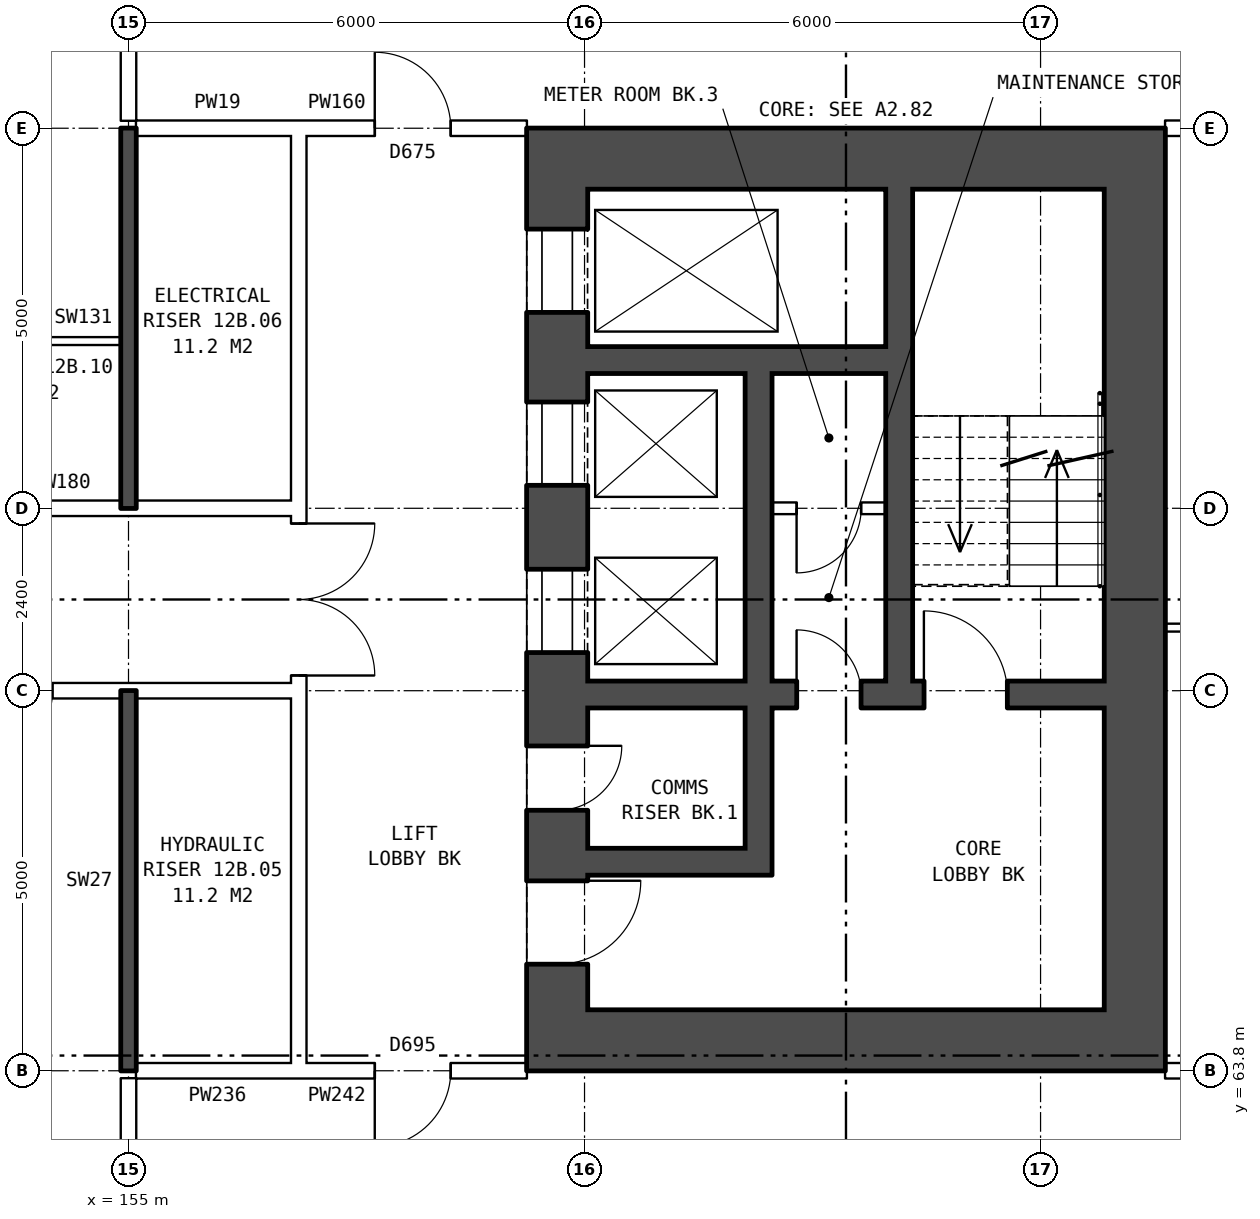
"""IFC4 building model, lengths in metres.
Left out: names, types, materials, properties, quantities, classifications, styles, units other than length and angle.
Written with IfcOpenShell. Run it as: python <this file> out.ifc"""

import sys

from ifc_helpers import new_model, si_unit, direction, frame, frame_2d, origin, place, context, subcontext, project, spatial, rectangle, extrude, element, fill, save


model = new_model("IFC4")
c1 = context("Model", 3, precision=1e-05, world=origin(), true_north=direction((0.0, 1.0)))
c2 = subcontext(c1, "Body", "Model", "MODEL_VIEW")
j1 = project(units=[si_unit("LENGTHUNIT", "METRE"), si_unit("PLANEANGLEUNIT", "RADIAN")], contexts=[c1])
p1 = place(None, origin())
s1 = spatial("IfcSite", under=j1, at=p1, CompositionType="ELEMENT")
p2 = place(p1, origin())
s2 = spatial("IfcBuilding", under=s1, at=p2, CompositionType="ELEMENT")
p3 = place(p2, frame((0.0, 0.0, 47.4)))
s3 = spatial("IfcBuildingStorey", under=s2, at=p3, CompositionType="ELEMENT", Elevation=47.4)
p4 = place(p3, frame((160.64, 75.4, 0.0), z_axis=(0.0, 0.0, 1.0), x_axis=(0.0, -1.0, 0.0)))
e1 = element("IfcWall", 1, at=p4, inside=s3, PredefinedType="SHEAR", context=c2, shape_type="SweptSolid", body=[
    extrude(rectangle(XDim=10.8, YDim=0.8, at=frame_2d((5.4, 0.0))), origin(), (0.0, 0.0, 1.0), 2.85),
])
p5 = place(p4, frame((0.525, 0.0, 0.0)))
e2 = element("IfcOpeningElement", 2, at=p5, cuts=e1, PredefinedType="OPENING", context=c2, shape_type="SweptSolid", body=[
    extrude(rectangle(XDim=1.1, YDim=2.1, at=frame_2d((0.55, 1.05))), frame((0.0, 0.41, 0.0), z_axis=(0.0, -1.0, 0.0), x_axis=(1.0, 0.0, 0.0)), (0.0, 0.0, 1.0), 0.82),
])
p6 = place(p4, frame((2.8, 0.0, 0.0)))
e3 = element("IfcOpeningElement", 3, at=p6, cuts=e1, PredefinedType="OPENING", context=c2, shape_type="SweptSolid", body=[
    extrude(rectangle(XDim=1.1, YDim=2.1, at=frame_2d((0.55, 1.05))), frame((0.0, 0.41, 0.0), z_axis=(0.0, -1.0, 0.0), x_axis=(1.0, 0.0, 0.0)), (0.0, 0.0, 1.0), 0.82),
])
p7 = place(p4, frame((5.0, 0.0, 0.0)))
e4 = element("IfcOpeningElement", 4, at=p7, cuts=e1, PredefinedType="OPENING", context=c2, shape_type="SweptSolid", body=[
    extrude(rectangle(XDim=1.1, YDim=2.1, at=frame_2d((0.55, 1.05))), frame((0.0, 0.41, 0.0), z_axis=(0.0, -1.0, 0.0), x_axis=(1.0, 0.0, 0.0)), (0.0, 0.0, 1.0), 0.82),
])
p8 = place(p4, frame((9.1, 0.0, 0.0)))
e5 = element("IfcOpeningElement", 5, at=p8, cuts=e1, PredefinedType="OPENING", context=c2, shape_type="SweptSolid", body=[
    extrude(rectangle(XDim=1.1, YDim=2.1, at=frame_2d((0.55, 1.05))), frame((0.0, 0.41, 0.0), z_axis=(0.0, -1.0, 0.0), x_axis=(1.0, 0.0, 0.0)), (0.0, 0.0, 1.0), 0.82),
])
p9 = place(p4, frame((7.325, 0.0, 0.0)))
e6 = element("IfcOpeningElement", 6, at=p9, cuts=e1, PredefinedType="OPENING", context=c2, shape_type="SweptSolid", body=[
    extrude(rectangle(XDim=0.85, YDim=2.1, at=frame_2d((0.425, 1.05))), frame((0.0, 0.41, 0.0), z_axis=(0.0, -1.0, 0.0), x_axis=(1.0, 0.0, 0.0)), (0.0, 0.0, 1.0), 0.82),
])
p10 = place(p3, frame((168.24, 75.4, 0.0), z_axis=(0.0, 0.0, 1.0), x_axis=(0.0, -1.0, 0.0)))
e7 = element("IfcWall", 7, at=p10, inside=s3, PredefinedType="SHEAR", context=c2, shape_type="SweptSolid", body=[
    extrude(rectangle(XDim=10.8, YDim=0.8, at=frame_2d((5.4, 0.0))), origin(), (0.0, 0.0, 1.0), 2.85),
])
for number, where, z_axis, x_axis in (
    (8, (160.24, 75.8, 0.0), (0.0, 0.0, 1.0), (1.0, 0.0, 0.0)),
    (9, (160.24, 64.2, 0.0), (0.0, 0.0, 1.0), (1.0, 0.0, 0.0)),
):
    element("IfcWall", number, at=place(p3, frame(where, z_axis=z_axis, x_axis=x_axis)), inside=s3, PredefinedType="SHEAR", context=c2, shape_type="SweptSolid", body=[
        extrude(rectangle(XDim=8.4, YDim=0.8, at=frame_2d((4.2, 0.0))), origin(), (0.0, 0.0, 1.0), 2.85),
    ])
p11 = place(p3, frame((161.04, 73.15, 0.0), z_axis=(0.0, 0.0, 1.0), x_axis=(1.0, 0.0, 0.0)))
e10 = element("IfcWall", 10, at=p11, inside=s3, PredefinedType="SHEAR", context=c2, shape_type="SweptSolid", body=[
    extrude(rectangle(XDim=3.925, YDim=0.35, at=frame_2d((1.962, 0.0))), origin(), (0.0, 0.0, 1.0), 2.85),
])
p12 = place(p3, frame((163.465, 71.2, 0.0), z_axis=(0.0, 0.0, 1.0), x_axis=(1.0, 0.0, 0.0)))
e11 = element("IfcWall", 11, at=p12, inside=s3, PredefinedType="PARTITIONING", context=c2, shape_type="SweptSolid", body=[
    extrude(rectangle(XDim=1.5, YDim=0.15, at=frame_2d((0.75, 0.0))), origin(), (0.0, 0.0, 1.0), 2.85),
])
p13 = place(p12, frame((0.325, 0.0, 0.0)))
e12 = element("IfcOpeningElement", 12, at=p13, cuts=e11, PredefinedType="OPENING", context=c2, shape_type="SweptSolid", body=[
    extrude(rectangle(XDim=0.85, YDim=2.1, at=frame_2d((0.425, 1.05))), frame((0.0, 0.085, 0.0), z_axis=(0.0, -1.0, 0.0), x_axis=(1.0, 0.0, 0.0)), (0.0, 0.0, 1.0), 0.17),
])
p14 = place(p3, frame((161.04, 68.75, 0.0), z_axis=(0.0, 0.0, 1.0), x_axis=(1.0, 0.0, 0.0)))
e13 = element("IfcWall", 13, at=p14, inside=s3, PredefinedType="SHEAR", context=c2, shape_type="SweptSolid", body=[
    extrude(rectangle(XDim=6.8, YDim=0.35, at=frame_2d((3.4, 0.0))), origin(), (0.0, 0.0, 1.0), 2.85),
])
p15 = place(p14, frame((4.425, 0.0, 0.0)))
e14 = element("IfcOpeningElement", 14, at=p15, cuts=e13, PredefinedType="OPENING", context=c2, shape_type="SweptSolid", body=[
    extrude(rectangle(XDim=1.1, YDim=2.1, at=frame_2d((0.55, 1.05))), frame((0.0, 0.185, 0.0), z_axis=(0.0, -1.0, 0.0), x_axis=(1.0, 0.0, 0.0)), (0.0, 0.0, 1.0), 0.37),
])
p16 = place(p14, frame((2.75, 0.0, 0.0)))
e15 = element("IfcOpeningElement", 15, at=p16, cuts=e13, PredefinedType="OPENING", context=c2, shape_type="SweptSolid", body=[
    extrude(rectangle(XDim=0.85, YDim=2.1, at=frame_2d((0.425, 1.05))), frame((0.0, 0.185, 0.0), z_axis=(0.0, -1.0, 0.0), x_axis=(1.0, 0.0, 0.0)), (0.0, 0.0, 1.0), 0.37),
])
p17 = place(p3, frame((161.04, 66.55, 0.0), z_axis=(0.0, 0.0, 1.0), x_axis=(1.0, 0.0, 0.0)))
e16 = element("IfcWall", 16, at=p17, inside=s3, PredefinedType="SHEAR", context=c2, shape_type="SweptSolid", body=[
    extrude(rectangle(XDim=2.075, YDim=0.35, at=frame_2d((1.038, 0.0))), origin(), (0.0, 0.0, 1.0), 2.85),
])
p18 = place(p3, frame((163.29, 72.975, 0.0), z_axis=(0.0, 0.0, 1.0), x_axis=(0.0, -1.0, 0.0)))
e17 = element("IfcWall", 17, at=p18, inside=s3, PredefinedType="SHEAR", context=c2, shape_type="SweptSolid", body=[
    extrude(rectangle(XDim=4.05, YDim=0.35, at=frame_2d((2.025, 0.0))), origin(), (0.0, 0.0, 1.0), 2.85),
])
p19 = place(p3, frame((163.29, 68.575, 0.0), z_axis=(0.0, 0.0, 1.0), x_axis=(0.0, -1.0, 0.0)))
e18 = element("IfcWall", 18, at=p19, inside=s3, PredefinedType="SHEAR", context=c2, shape_type="SweptSolid", body=[
    extrude(rectangle(XDim=2.2, YDim=0.35, at=frame_2d((1.1, 0.0))), origin(), (0.0, 0.0, 1.0), 2.85),
])
p20 = place(p3, frame((165.14, 75.4, 0.0), z_axis=(0.0, 0.0, 1.0), x_axis=(0.0, -1.0, 0.0)))
e19 = element("IfcWall", 19, at=p20, inside=s3, PredefinedType="SHEAR", context=c2, shape_type="SweptSolid", body=[
    extrude(rectangle(XDim=6.475, YDim=0.35, at=frame_2d((3.237, 0.0))), origin(), (0.0, 0.0, 1.0), 2.85),
])
p21 = place(p3, frame((157.24, 63.9, 0.0), z_axis=(0.0, 0.0, 1.0), x_axis=(0.0, 1.0, 0.0)))
e20 = element("IfcWall", 20, at=p21, inside=s3, PredefinedType="PARTITIONING", context=c2, shape_type="SweptSolid", body=[
    extrude(rectangle(XDim=12.2, YDim=0.2, at=frame_2d((6.1, 0.0))), origin(), (0.0, 0.0, 1.0), 2.85),
])
p22 = place(p21, frame((5.1, 0.0, 0.0)))
e21 = element("IfcOpeningElement", 21, at=p22, cuts=e20, PredefinedType="OPENING", context=c2, shape_type="SweptSolid", body=[
    extrude(rectangle(XDim=2.0, YDim=2.1, at=frame_2d((1.0, 1.05))), frame((0.0, 0.11, 0.0), z_axis=(0.0, -1.0, 0.0), x_axis=(1.0, 0.0, 0.0)), (0.0, 0.0, 1.0), 0.22),
])
p23 = place(p3, frame((155.1, 63.8, 0.0), z_axis=(0.0, 0.0, 1.0), x_axis=(1.0, 0.0, 0.0)))
e22 = element("IfcWall", 22, at=p23, inside=s3, PredefinedType="PARTITIONING", context=c2, shape_type="SweptSolid", body=[
    extrude(rectangle(XDim=2.14, YDim=0.2, at=frame_2d((1.07, 0.0))), origin(), (0.0, 0.0, 1.0), 2.85),
])
p24 = place(p3, frame((157.24, 63.8, 0.0), z_axis=(0.0, 0.0, 1.0), x_axis=(1.0, 0.0, 0.0)))
e23 = element("IfcWall", 23, at=p24, inside=s3, PredefinedType="PARTITIONING", context=c2, shape_type="SweptSolid", body=[
    extrude(rectangle(XDim=3.0, YDim=0.2, at=frame_2d((1.5, 0.0))), origin(), (0.0, 0.0, 1.0), 2.85),
])
p25 = place(p24, frame((1.0, 0.0, 0.0)))
e24 = element("IfcOpeningElement", 24, at=p25, cuts=e23, PredefinedType="OPENING", context=c2, shape_type="SweptSolid", body=[
    extrude(rectangle(XDim=1.0, YDim=2.1, at=frame_2d((0.5, 1.05))), frame((0.0, 0.11, 0.0), z_axis=(0.0, -1.0, 0.0), x_axis=(1.0, 0.0, 0.0)), (0.0, 0.0, 1.0), 0.22),
])
p26 = place(p3, frame((168.64, 63.8, 0.0), z_axis=(0.0, 0.0, 1.0), x_axis=(1.0, 0.0, 0.0)))
e25 = element("IfcWall", 25, at=p26, inside=s3, PredefinedType="PARTITIONING", context=c2, shape_type="SweptSolid", body=[
    extrude(rectangle(XDim=4.36, YDim=0.2, at=frame_2d((2.18, 0.0))), origin(), (0.0, 0.0, 1.0), 2.85),
])
p27 = place(p3, frame((142.76, 68.8, 0.0), z_axis=(0.0, 0.0, 1.0), x_axis=(1.0, 0.0, 0.0)))
e26 = element("IfcWall", 26, at=p27, inside=s3, PredefinedType="PARTITIONING", context=c2, shape_type="SweptSolid", body=[
    extrude(rectangle(XDim=14.48, YDim=0.2, at=frame_2d((7.24, 0.0))), origin(), (0.0, 0.0, 1.0), 2.85),
])
p28 = place(p27, frame((4.24, 0.0, 0.0)))
e27 = element("IfcOpeningElement", 27, at=p28, cuts=e26, PredefinedType="OPENING", context=c2, shape_type="SweptSolid", body=[
    extrude(rectangle(XDim=1.0, YDim=2.1, at=frame_2d((0.5, 1.05))), frame((0.0, 0.11, 0.0), z_axis=(0.0, -1.0, 0.0), x_axis=(1.0, 0.0, 0.0)), (0.0, 0.0, 1.0), 0.22),
])
p29 = place(p27, frame((10.24, 0.0, 0.0)))
e28 = element("IfcOpeningElement", 28, at=p29, cuts=e26, PredefinedType="OPENING", context=c2, shape_type="SweptSolid", body=[
    extrude(rectangle(XDim=1.0, YDim=2.1, at=frame_2d((0.5, 1.05))), frame((0.0, 0.11, 0.0), z_axis=(0.0, -1.0, 0.0), x_axis=(1.0, 0.0, 0.0)), (0.0, 0.0, 1.0), 0.22),
])
p30 = place(p3, frame((168.64, 69.63, 0.0), z_axis=(0.0, 0.0, 1.0), x_axis=(1.0, 0.0, 0.0)))
e29 = element("IfcWall", 29, at=p30, inside=s3, PredefinedType="PARTITIONING", context=c2, shape_type="SweptSolid", body=[
    extrude(rectangle(XDim=4.26, YDim=0.1, at=frame_2d((2.13, 0.0))), origin(), (0.0, 0.0, 1.0), 2.85),
])
p31 = place(p3, frame((142.76, 71.2, 0.0), z_axis=(0.0, 0.0, 1.0), x_axis=(1.0, 0.0, 0.0)))
e30 = element("IfcWall", 30, at=p31, inside=s3, PredefinedType="PARTITIONING", context=c2, shape_type="SweptSolid", body=[
    extrude(rectangle(XDim=14.48, YDim=0.2, at=frame_2d((7.24, 0.0))), origin(), (0.0, 0.0, 1.0), 2.85),
])
p32 = place(p31, frame((1.12, 0.0, 0.0)))
e31 = element("IfcOpeningElement", 31, at=p32, cuts=e30, PredefinedType="OPENING", context=c2, shape_type="SweptSolid", body=[
    extrude(rectangle(XDim=1.0, YDim=2.1, at=frame_2d((0.5, 1.05))), frame((0.0, 0.11, 0.0), z_axis=(0.0, -1.0, 0.0), x_axis=(1.0, 0.0, 0.0)), (0.0, 0.0, 1.0), 0.22),
])
p33 = place(p31, frame((7.24, 0.0, 0.0)))
e32 = element("IfcOpeningElement", 32, at=p33, cuts=e30, PredefinedType="OPENING", context=c2, shape_type="SweptSolid", body=[
    extrude(rectangle(XDim=1.0, YDim=2.1, at=frame_2d((0.5, 1.05))), frame((0.0, 0.11, 0.0), z_axis=(0.0, -1.0, 0.0), x_axis=(1.0, 0.0, 0.0)), (0.0, 0.0, 1.0), 0.22),
])
p34 = place(p3, frame((152.0, 73.4, 0.0), z_axis=(0.0, 0.0, 1.0), x_axis=(1.0, 0.0, 0.0)))
e33 = element("IfcWall", 33, at=p34, inside=s3, PredefinedType="PARTITIONING", context=c2, shape_type="SweptSolid", body=[
    extrude(rectangle(XDim=2.9, YDim=0.1, at=frame_2d((1.45, 0.0))), origin(), (0.0, 0.0, 1.0), 2.85),
])
p35 = place(p3, frame((155.1, 76.2, 0.0), z_axis=(0.0, 0.0, 1.0), x_axis=(1.0, 0.0, 0.0)))
e34 = element("IfcWall", 34, at=p35, inside=s3, PredefinedType="PARTITIONING", context=c2, shape_type="SweptSolid", body=[
    extrude(rectangle(XDim=2.14, YDim=0.2, at=frame_2d((1.07, 0.0))), origin(), (0.0, 0.0, 1.0), 2.85),
])
p36 = place(p3, frame((157.24, 76.2, 0.0), z_axis=(0.0, 0.0, 1.0), x_axis=(1.0, 0.0, 0.0)))
e35 = element("IfcWall", 35, at=p36, inside=s3, PredefinedType="PARTITIONING", context=c2, shape_type="SweptSolid", body=[
    extrude(rectangle(XDim=3.0, YDim=0.2, at=frame_2d((1.5, 0.0))), origin(), (0.0, 0.0, 1.0), 2.85),
])
p37 = place(p36, frame((1.0, 0.0, 0.0)))
e36 = element("IfcOpeningElement", 36, at=p37, cuts=e35, PredefinedType="OPENING", context=c2, shape_type="SweptSolid", body=[
    extrude(rectangle(XDim=1.0, YDim=2.1, at=frame_2d((0.5, 1.05))), frame((0.0, 0.11, 0.0), z_axis=(0.0, -1.0, 0.0), x_axis=(1.0, 0.0, 0.0)), (0.0, 0.0, 1.0), 0.22),
])
p38 = place(p3, frame((168.64, 76.2, 0.0), z_axis=(0.0, 0.0, 1.0), x_axis=(1.0, 0.0, 0.0)))
e37 = element("IfcWall", 37, at=p38, inside=s3, PredefinedType="PARTITIONING", context=c2, shape_type="SweptSolid", body=[
    extrude(rectangle(XDim=4.36, YDim=0.2, at=frame_2d((2.18, 0.0))), origin(), (0.0, 0.0, 1.0), 2.85),
])
p39 = place(p3, frame((155.0, 61.5, 0.0), z_axis=(0.0, 0.0, 1.0), x_axis=(0.0, 1.0, 0.0)))
e38 = element("IfcWall", 38, at=p39, inside=s3, PredefinedType="PARTITIONING", context=c2, shape_type="SweptSolid", body=[
    extrude(rectangle(XDim=2.2, YDim=0.2, at=frame_2d((1.1, 0.0))), origin(), (0.0, 0.0, 1.0), 2.85),
])
for number, where, z_axis, x_axis in (
    (39, (155.0, 63.8, 0.0), (0.0, 0.0, 1.0), (0.0, 1.0, 0.0)),
    (40, (155.0, 71.2, 0.0), (0.0, 0.0, 1.0), (0.0, 1.0, 0.0)),
):
    element("IfcWall", number, at=place(p3, frame(where, z_axis=z_axis, x_axis=x_axis)), inside=s3, PredefinedType="SOLIDWALL", context=c2, shape_type="SweptSolid", body=[
        extrude(rectangle(XDim=5.0, YDim=0.2, at=frame_2d((2.5, 0.0))), origin(), (0.0, 0.0, 1.0), 2.85),
    ])
p40 = place(p3, frame((155.0, 76.3, 0.0), z_axis=(0.0, 0.0, 1.0), x_axis=(0.0, 1.0, 0.0)))
e41 = element("IfcWall", 41, at=p40, inside=s3, PredefinedType="PARTITIONING", context=c2, shape_type="SweptSolid", body=[
    extrude(rectangle(XDim=2.2, YDim=0.2, at=frame_2d((1.1, 0.0))), origin(), (0.0, 0.0, 1.0), 2.85),
])
p41 = place(p5, origin())
e42 = element("IfcDoor", 42, at=p41, inside=s3, OperationType="DOUBLE_DOOR_SLIDING", PredefinedType="DOOR", context=c2, shape_type="SweptSolid", body=[
    extrude(rectangle(XDim=1.1, YDim=2.1, at=frame_2d((0.55, 1.05))), frame((0.0, 0.385, 0.0), z_axis=(0.0, -1.0, 0.0), x_axis=(1.0, 0.0, 0.0)), (0.0, 0.0, 1.0), 0.05),
])
fill(e2, e42)
p42 = place(p6, origin())
e43 = element("IfcDoor", 43, at=p42, inside=s3, OperationType="DOUBLE_DOOR_SLIDING", PredefinedType="DOOR", context=c2, shape_type="SweptSolid", body=[
    extrude(rectangle(XDim=1.1, YDim=2.1, at=frame_2d((0.55, 1.05))), frame((0.0, 0.385, 0.0), z_axis=(0.0, -1.0, 0.0), x_axis=(1.0, 0.0, 0.0)), (0.0, 0.0, 1.0), 0.05),
])
fill(e3, e43)
p43 = place(p7, origin())
e44 = element("IfcDoor", 44, at=p43, inside=s3, OperationType="DOUBLE_DOOR_SLIDING", PredefinedType="DOOR", context=c2, shape_type="SweptSolid", body=[
    extrude(rectangle(XDim=1.1, YDim=2.1, at=frame_2d((0.55, 1.05))), frame((0.0, 0.385, 0.0), z_axis=(0.0, -1.0, 0.0), x_axis=(1.0, 0.0, 0.0)), (0.0, 0.0, 1.0), 0.05),
])
fill(e4, e44)
p44 = place(p8, origin())
e45 = element("IfcDoor", 45, at=p44, inside=s3, OperationType="SINGLE_SWING_LEFT", PredefinedType="DOOR", context=c2, shape_type="SweptSolid", body=[
    extrude(rectangle(XDim=1.1, YDim=2.1, at=frame_2d((0.55, 1.05))), frame((0.0, 0.385, 0.0), z_axis=(0.0, -1.0, 0.0), x_axis=(1.0, 0.0, 0.0)), (0.0, 0.0, 1.0), 0.05),
])
fill(e5, e45)
p45 = place(p15, origin())
e46 = element("IfcDoor", 46, at=p45, inside=s3, OperationType="SINGLE_SWING_LEFT", PredefinedType="DOOR", context=c2, shape_type="SweptSolid", body=[
    extrude(rectangle(XDim=1.1, YDim=2.1, at=frame_2d((0.55, 1.05))), frame((0.0, 0.025, 0.0), z_axis=(0.0, -1.0, 0.0), x_axis=(1.0, 0.0, 0.0)), (0.0, 0.0, 1.0), 0.05),
])
fill(e14, e46)
p46 = place(p9, origin())
e47 = element("IfcDoor", 47, at=p46, inside=s3, OperationType="SINGLE_SWING_LEFT", PredefinedType="DOOR", context=c2, shape_type="SweptSolid", body=[
    extrude(rectangle(XDim=0.85, YDim=2.1, at=frame_2d((0.425, 1.05))), frame((0.0, 0.385, 0.0), z_axis=(0.0, -1.0, 0.0), x_axis=(1.0, 0.0, 0.0)), (0.0, 0.0, 1.0), 0.05),
])
fill(e6, e47)
p47 = place(p16, origin())
e48 = element("IfcDoor", 48, at=p47, inside=s3, OperationType="SINGLE_SWING_LEFT", PredefinedType="DOOR", context=c2, shape_type="SweptSolid", body=[
    extrude(rectangle(XDim=0.85, YDim=2.1, at=frame_2d((0.425, 1.05))), frame((0.0, 0.025, 0.0), z_axis=(0.0, -1.0, 0.0), x_axis=(1.0, 0.0, 0.0)), (0.0, 0.0, 1.0), 0.05),
])
fill(e15, e48)
p48 = place(p13, frame((0.85, 0.0, 0.0), z_axis=(0.0, 0.0, 1.0), x_axis=(-1.0, 0.0, 0.0)))
e49 = element("IfcDoor", 49, at=p48, inside=s3, OperationType="SINGLE_SWING_RIGHT", PredefinedType="DOOR", context=c2, shape_type="SweptSolid", body=[
    extrude(rectangle(XDim=0.85, YDim=2.1, at=frame_2d((0.425, 1.05))), frame((0.0, 0.025, 0.0), z_axis=(0.0, -1.0, 0.0), x_axis=(1.0, 0.0, 0.0)), (0.0, 0.0, 1.0), 0.05),
])
fill(e12, e49)
p49 = place(p22, frame((2.0, 0.0, 0.0), z_axis=(0.0, 0.0, 1.0), x_axis=(-1.0, 0.0, 0.0)))
e50 = element("IfcDoor", 50, at=p49, inside=s3, OperationType="DOUBLE_DOOR_SINGLE_SWING", PredefinedType="DOOR", context=c2, shape_type="SweptSolid", body=[
    extrude(rectangle(XDim=2.0, YDim=2.1, at=frame_2d((1.0, 1.05))), frame((0.0, 0.025, 0.0), z_axis=(0.0, -1.0, 0.0), x_axis=(1.0, 0.0, 0.0)), (0.0, 0.0, 1.0), 0.05),
])
fill(e21, e50)
p50 = place(p25, frame((1.0, 0.0, 0.0), z_axis=(0.0, 0.0, 1.0), x_axis=(-1.0, 0.0, 0.0)))
e51 = element("IfcDoor", 51, at=p50, inside=s3, OperationType="SINGLE_SWING_RIGHT", PredefinedType="DOOR", context=c2, shape_type="SweptSolid", body=[
    extrude(rectangle(XDim=1.0, YDim=2.1, at=frame_2d((0.5, 1.05))), frame((0.0, 0.025, 0.0), z_axis=(0.0, -1.0, 0.0), x_axis=(1.0, 0.0, 0.0)), (0.0, 0.0, 1.0), 0.05),
])
fill(e24, e51)
p51 = place(p37, origin())
e52 = element("IfcDoor", 52, at=p51, inside=s3, OperationType="SINGLE_SWING_LEFT", PredefinedType="DOOR", context=c2, shape_type="SweptSolid", body=[
    extrude(rectangle(XDim=1.0, YDim=2.1, at=frame_2d((0.5, 1.05))), frame((0.0, 0.025, 0.0), z_axis=(0.0, -1.0, 0.0), x_axis=(1.0, 0.0, 0.0)), (0.0, 0.0, 1.0), 0.05),
])
fill(e36, e52)
save(model, sys.argv[1])
